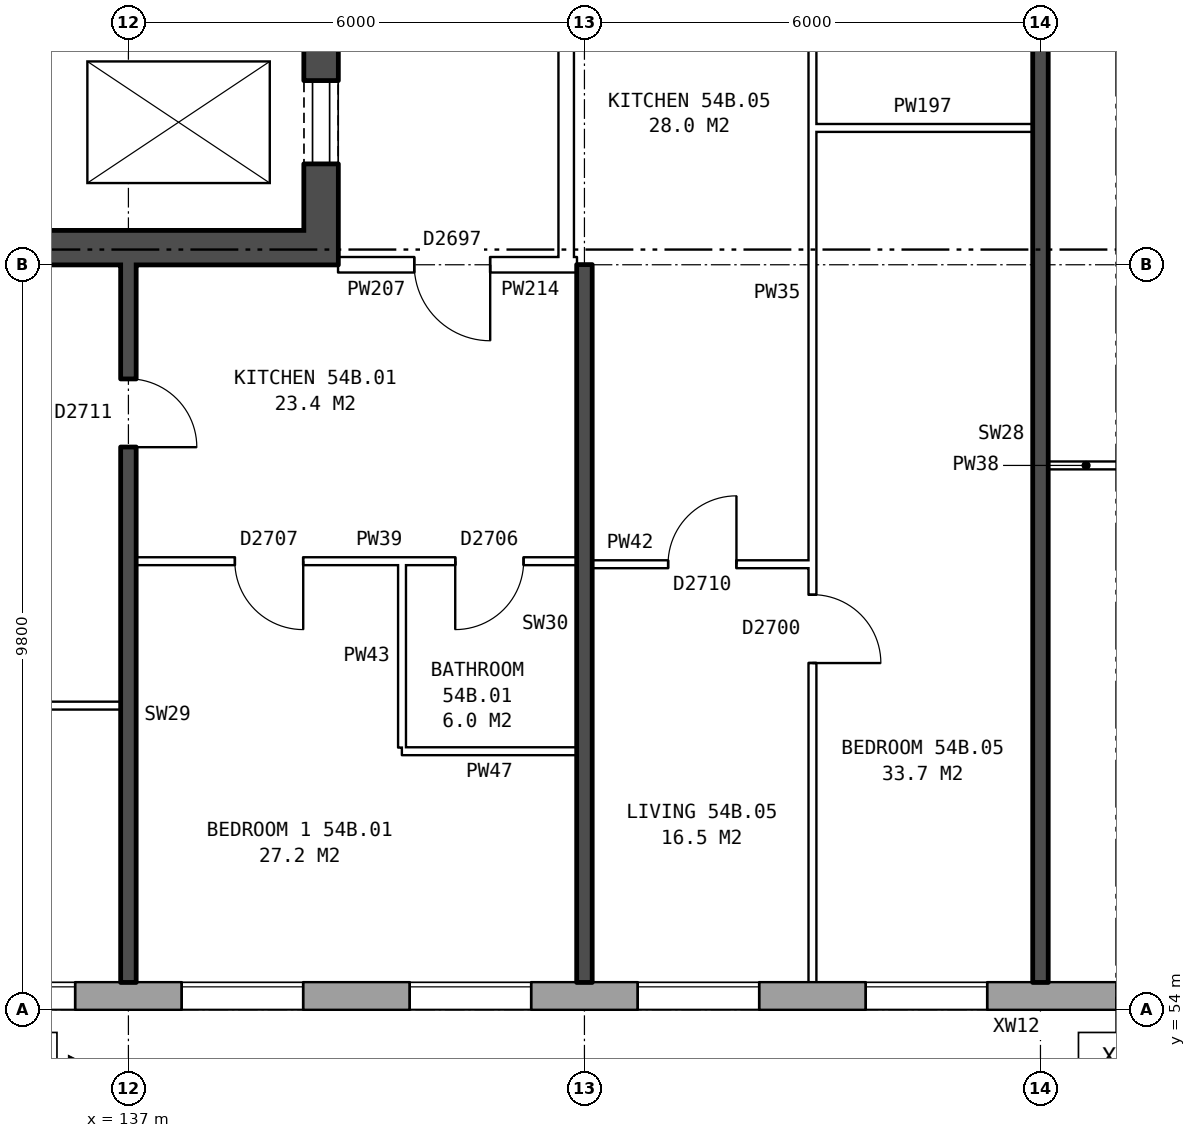
"""IFC4 building model, lengths in metres.
Left out: names, types, materials, properties, quantities, classifications, styles, units other than length and angle.
Written with IfcOpenShell. Run it as: python <this file> out.ifc"""

import sys

from ifc_helpers import new_model, si_unit, direction, frame, frame_2d, origin, place, context, subcontext, project, spatial, rectangle, extrude, element, fill, save


model = new_model("IFC4")
c1 = context("Model", 3, precision=1e-05, world=origin(), true_north=direction((0.0, 1.0)))
c2 = subcontext(c1, "Body", "Model", "MODEL_VIEW")
j1 = project(units=[si_unit("LENGTHUNIT", "METRE"), si_unit("PLANEANGLEUNIT", "RADIAN")], contexts=[c1])
p1 = place(None, origin())
s1 = spatial("IfcSite", under=j1, at=p1, CompositionType="ELEMENT")
p2 = place(p1, origin())
s2 = spatial("IfcBuilding", under=s1, at=p2, CompositionType="ELEMENT")
p3 = place(p2, frame((0.0, 0.0, 191.3)))
s3 = spatial("IfcBuildingStorey", under=s2, at=p3, CompositionType="ELEMENT", Elevation=191.3)
p4 = place(p3, frame((134.075, 54.18, 0.0), z_axis=(0.0, 0.0, 1.0), x_axis=(1.0, 0.0, 0.0)))
e1 = element("IfcWall", 1, at=p4, inside=s3, PredefinedType="STANDARD", context=c2, shape_type="SweptSolid", body=[
    extrude(rectangle(XDim=33.101, YDim=0.36, at=frame_2d((16.55, 0.0))), origin(), (0.0, 0.0, 1.0), 2.85),
])
p5 = place(p4, frame((0.625, 0.0, 0.8)))
e2 = element("IfcOpeningElement", 2, at=p5, cuts=e1, PredefinedType="OPENING", context=c2, shape_type="SweptSolid", body=[
    extrude(rectangle(XDim=1.6, YDim=1.8, at=frame_2d((0.8, 0.9))), frame((0.0, 0.19, 0.0), z_axis=(0.0, -1.0, 0.0), x_axis=(1.0, 0.0, 0.0)), (0.0, 0.0, 1.0), 0.38),
])
p6 = place(p4, frame((3.625, 0.0, 0.8)))
e3 = element("IfcOpeningElement", 3, at=p6, cuts=e1, PredefinedType="OPENING", context=c2, shape_type="SweptSolid", body=[
    extrude(rectangle(XDim=1.6, YDim=1.8, at=frame_2d((0.8, 0.9))), frame((0.0, 0.19, 0.0), z_axis=(0.0, -1.0, 0.0), x_axis=(1.0, 0.0, 0.0)), (0.0, 0.0, 1.0), 0.38),
])
p7 = place(p4, frame((6.625, 0.0, 0.8)))
e4 = element("IfcOpeningElement", 4, at=p7, cuts=e1, PredefinedType="OPENING", context=c2, shape_type="SweptSolid", body=[
    extrude(rectangle(XDim=1.6, YDim=1.8, at=frame_2d((0.8, 0.9))), frame((0.0, 0.19, 0.0), z_axis=(0.0, -1.0, 0.0), x_axis=(1.0, 0.0, 0.0)), (0.0, 0.0, 1.0), 0.38),
])
p8 = place(p4, frame((9.625, 0.0, 0.8)))
e5 = element("IfcOpeningElement", 5, at=p8, cuts=e1, PredefinedType="OPENING", context=c2, shape_type="SweptSolid", body=[
    extrude(rectangle(XDim=1.6, YDim=1.8, at=frame_2d((0.8, 0.9))), frame((0.0, 0.19, 0.0), z_axis=(0.0, -1.0, 0.0), x_axis=(1.0, 0.0, 0.0)), (0.0, 0.0, 1.0), 0.38),
])
p9 = place(p4, frame((12.625, 0.0, 0.8)))
e6 = element("IfcOpeningElement", 6, at=p9, cuts=e1, PredefinedType="OPENING", context=c2, shape_type="SweptSolid", body=[
    extrude(rectangle(XDim=1.6, YDim=1.8, at=frame_2d((0.8, 0.9))), frame((0.0, 0.19, 0.0), z_axis=(0.0, -1.0, 0.0), x_axis=(1.0, 0.0, 0.0)), (0.0, 0.0, 1.0), 0.38),
])
p10 = place(p4, frame((15.925, 0.0, 0.15)))
e7 = element("IfcOpeningElement", 7, at=p10, cuts=e1, PredefinedType="OPENING", context=c2, shape_type="SweptSolid", body=[
    extrude(rectangle(XDim=1.2, YDim=1.2, at=frame_2d((0.6, 0.6))), frame((0.0, 0.19, 0.0), z_axis=(0.0, -1.0, 0.0), x_axis=(1.0, 0.0, 0.0)), (0.0, 0.0, 1.0), 0.38),
])
p11 = place(p4, frame((18.625, 0.0, 0.8)))
e8 = element("IfcOpeningElement", 8, at=p11, cuts=e1, PredefinedType="OPENING", context=c2, shape_type="SweptSolid", body=[
    extrude(rectangle(XDim=1.6, YDim=1.8, at=frame_2d((0.8, 0.9))), frame((0.0, 0.19, 0.0), z_axis=(0.0, -1.0, 0.0), x_axis=(1.0, 0.0, 0.0)), (0.0, 0.0, 1.0), 0.38),
])
p12 = place(p4, frame((21.625, 0.0, 0.8)))
e9 = element("IfcOpeningElement", 9, at=p12, cuts=e1, PredefinedType="OPENING", context=c2, shape_type="SweptSolid", body=[
    extrude(rectangle(XDim=1.6, YDim=1.8, at=frame_2d((0.8, 0.9))), frame((0.0, 0.19, 0.0), z_axis=(0.0, -1.0, 0.0), x_axis=(1.0, 0.0, 0.0)), (0.0, 0.0, 1.0), 0.38),
])
p13 = place(p4, frame((24.625, 0.0, 0.8)))
e10 = element("IfcOpeningElement", 10, at=p13, cuts=e1, PredefinedType="OPENING", context=c2, shape_type="SweptSolid", body=[
    extrude(rectangle(XDim=1.6, YDim=1.8, at=frame_2d((0.8, 0.9))), frame((0.0, 0.19, 0.0), z_axis=(0.0, -1.0, 0.0), x_axis=(1.0, 0.0, 0.0)), (0.0, 0.0, 1.0), 0.38),
])
p14 = place(p4, frame((27.625, 0.0, 0.8)))
e11 = element("IfcOpeningElement", 11, at=p14, cuts=e1, PredefinedType="OPENING", context=c2, shape_type="SweptSolid", body=[
    extrude(rectangle(XDim=1.6, YDim=1.8, at=frame_2d((0.8, 0.9))), frame((0.0, 0.19, 0.0), z_axis=(0.0, -1.0, 0.0), x_axis=(1.0, 0.0, 0.0)), (0.0, 0.0, 1.0), 0.38),
])
p15 = place(p4, frame((30.625, 0.0, 0.8)))
e12 = element("IfcOpeningElement", 12, at=p15, cuts=e1, PredefinedType="OPENING", context=c2, shape_type="SweptSolid", body=[
    extrude(rectangle(XDim=1.6, YDim=1.8, at=frame_2d((0.8, 0.9))), frame((0.0, 0.19, 0.0), z_axis=(0.0, -1.0, 0.0), x_axis=(1.0, 0.0, 0.0)), (0.0, 0.0, 1.0), 0.38),
])
p16 = place(p3, frame((139.535, 63.8, 0.0), z_axis=(0.0, 0.0, 1.0), x_axis=(0.0, 1.0, 0.0)))
e13 = element("IfcWall", 13, at=p16, inside=s3, PredefinedType="SHEAR", context=c2, shape_type="SweptSolid", body=[
    extrude(rectangle(XDim=12.4, YDim=0.45, at=frame_2d((6.2, 0.0))), origin(), (0.0, 0.0, 1.0), 2.85),
])
p17 = place(p16, frame((1.325, 0.0, 0.0)))
e14 = element("IfcOpeningElement", 14, at=p17, cuts=e13, PredefinedType="OPENING", context=c2, shape_type="SweptSolid", body=[
    extrude(rectangle(XDim=1.1, YDim=2.1, at=frame_2d((0.55, 1.05))), frame((0.0, 0.235, 0.0), z_axis=(0.0, -1.0, 0.0), x_axis=(1.0, 0.0, 0.0)), (0.0, 0.0, 1.0), 0.47),
])
p18 = place(p16, frame((3.6, 0.0, 0.0)))
e15 = element("IfcOpeningElement", 15, at=p18, cuts=e13, PredefinedType="OPENING", context=c2, shape_type="SweptSolid", body=[
    extrude(rectangle(XDim=1.1, YDim=2.1, at=frame_2d((0.55, 1.05))), frame((0.0, 0.235, 0.0), z_axis=(0.0, -1.0, 0.0), x_axis=(1.0, 0.0, 0.0)), (0.0, 0.0, 1.0), 0.47),
])
p19 = place(p16, frame((5.8, 0.0, 0.0)))
e16 = element("IfcOpeningElement", 16, at=p19, cuts=e13, PredefinedType="OPENING", context=c2, shape_type="SweptSolid", body=[
    extrude(rectangle(XDim=1.1, YDim=2.1, at=frame_2d((0.55, 1.05))), frame((0.0, 0.235, 0.0), z_axis=(0.0, -1.0, 0.0), x_axis=(1.0, 0.0, 0.0)), (0.0, 0.0, 1.0), 0.47),
])
p20 = place(p16, frame((9.9, 0.0, 0.0)))
e17 = element("IfcOpeningElement", 17, at=p20, cuts=e13, PredefinedType="OPENING", context=c2, shape_type="SweptSolid", body=[
    extrude(rectangle(XDim=1.1, YDim=2.1, at=frame_2d((0.55, 1.05))), frame((0.0, 0.235, 0.0), z_axis=(0.0, -1.0, 0.0), x_axis=(1.0, 0.0, 0.0)), (0.0, 0.0, 1.0), 0.47),
])
p21 = place(p16, frame((8.125, 0.0, 0.0)))
e18 = element("IfcOpeningElement", 18, at=p21, cuts=e13, PredefinedType="OPENING", context=c2, shape_type="SweptSolid", body=[
    extrude(rectangle(XDim=0.85, YDim=2.1, at=frame_2d((0.425, 1.05))), frame((0.0, 0.235, 0.0), z_axis=(0.0, -1.0, 0.0), x_axis=(1.0, 0.0, 0.0)), (0.0, 0.0, 1.0), 0.47),
])
p22 = place(p3, frame((139.31, 64.025, 0.0), z_axis=(0.0, 0.0, 1.0), x_axis=(-1.0, 0.0, 0.0)))
e19 = element("IfcWall", 19, at=p22, inside=s3, PredefinedType="SHEAR", context=c2, shape_type="SweptSolid", body=[
    extrude(rectangle(XDim=7.5, YDim=0.45, at=frame_2d((3.75, 0.0))), origin(), (0.0, 0.0, 1.0), 2.85),
])
p23 = place(p3, frame((142.76, 63.9, 0.0), z_axis=(0.0, 0.0, 1.0), x_axis=(0.0, 1.0, 0.0)))
e20 = element("IfcWall", 20, at=p23, inside=s3, PredefinedType="PARTITIONING", context=c2, shape_type="SweptSolid", body=[
    extrude(rectangle(XDim=12.2, YDim=0.2, at=frame_2d((6.1, 0.0))), origin(), (0.0, 0.0, 1.0), 2.85),
])
p24 = place(p23, frame((5.1, 0.0, 0.0)))
e21 = element("IfcOpeningElement", 21, at=p24, cuts=e20, PredefinedType="OPENING", context=c2, shape_type="SweptSolid", body=[
    extrude(rectangle(XDim=2.0, YDim=2.1, at=frame_2d((1.0, 1.05))), frame((0.0, 0.11, 0.0), z_axis=(0.0, -1.0, 0.0), x_axis=(1.0, 0.0, 0.0)), (0.0, 0.0, 1.0), 0.22),
])
p25 = place(p3, frame((140.6, 57.4, 0.0), z_axis=(0.0, 0.0, 1.0), x_axis=(1.0, 0.0, 0.0)))
e22 = element("IfcWall", 22, at=p25, inside=s3, PredefinedType="PARTITIONING", context=c2, shape_type="SweptSolid", body=[
    extrude(rectangle(XDim=2.3, YDim=0.1, at=frame_2d((1.15, 0.0))), origin(), (0.0, 0.0, 1.0), 2.85),
])
p26 = place(p3, frame((131.36, 58.0, 0.0), z_axis=(0.0, 0.0, 1.0), x_axis=(1.0, 0.0, 0.0)))
e23 = element("IfcWall", 23, at=p26, inside=s3, PredefinedType="PARTITIONING", context=c2, shape_type="SweptSolid", body=[
    extrude(rectangle(XDim=5.54, YDim=0.1, at=frame_2d((2.77, 0.0))), origin(), (0.0, 0.0, 1.0), 2.85),
])
p27 = place(p26, frame((2.32, 0.0, 0.0)))
e24 = element("IfcOpeningElement", 24, at=p27, cuts=e23, PredefinedType="OPENING", context=c2, shape_type="SweptSolid", body=[
    extrude(rectangle(XDim=0.9, YDim=2.1, at=frame_2d((0.45, 1.05))), frame((0.0, 0.06, 0.0), z_axis=(0.0, -1.0, 0.0), x_axis=(1.0, 0.0, 0.0)), (0.0, 0.0, 1.0), 0.12),
])
p28 = place(p3, frame((143.1, 59.86, 0.0), z_axis=(0.0, 0.0, 1.0), x_axis=(1.0, 0.0, 0.0)))
e25 = element("IfcWall", 25, at=p28, inside=s3, PredefinedType="PARTITIONING", context=c2, shape_type="SweptSolid", body=[
    extrude(rectangle(XDim=2.9, YDim=0.1, at=frame_2d((1.45, 0.0))), origin(), (0.0, 0.0, 1.0), 2.85),
])
p29 = place(p28, frame((1.0, 0.0, 0.0)))
e26 = element("IfcOpeningElement", 26, at=p29, cuts=e25, PredefinedType="OPENING", context=c2, shape_type="SweptSolid", body=[
    extrude(rectangle(XDim=0.9, YDim=2.1, at=frame_2d((0.45, 1.05))), frame((0.0, 0.06, 0.0), z_axis=(0.0, -1.0, 0.0), x_axis=(1.0, 0.0, 0.0)), (0.0, 0.0, 1.0), 0.12),
])
p30 = place(p3, frame((137.1, 59.9, 0.0), z_axis=(0.0, 0.0, 1.0), x_axis=(1.0, 0.0, 0.0)))
e27 = element("IfcWall", 27, at=p30, inside=s3, PredefinedType="PARTITIONING", context=c2, shape_type="SweptSolid", body=[
    extrude(rectangle(XDim=5.8, YDim=0.1, at=frame_2d((2.9, 0.0))), origin(), (0.0, 0.0, 1.0), 2.85),
])
p31 = place(p30, frame((1.3, 0.0, 0.0)))
e28 = element("IfcOpeningElement", 28, at=p31, cuts=e27, PredefinedType="OPENING", context=c2, shape_type="SweptSolid", body=[
    extrude(rectangle(XDim=0.9, YDim=2.1, at=frame_2d((0.45, 1.05))), frame((0.0, 0.06, 0.0), z_axis=(0.0, -1.0, 0.0), x_axis=(1.0, 0.0, 0.0)), (0.0, 0.0, 1.0), 0.12),
])
p32 = place(p30, frame((4.2, 0.0, 0.0)))
e29 = element("IfcOpeningElement", 29, at=p32, cuts=e27, PredefinedType="OPENING", context=c2, shape_type="SweptSolid", body=[
    extrude(rectangle(XDim=0.9, YDim=2.1, at=frame_2d((0.45, 1.05))), frame((0.0, 0.06, 0.0), z_axis=(0.0, -1.0, 0.0), x_axis=(1.0, 0.0, 0.0)), (0.0, 0.0, 1.0), 0.12),
])
p33 = place(p3, frame((149.1, 61.16, 0.0), z_axis=(0.0, 0.0, 1.0), x_axis=(1.0, 0.0, 0.0)))
e30 = element("IfcWall", 30, at=p33, inside=s3, PredefinedType="PARTITIONING", context=c2, shape_type="SweptSolid", body=[
    extrude(rectangle(XDim=2.9, YDim=0.1, at=frame_2d((1.45, 0.0))), origin(), (0.0, 0.0, 1.0), 2.85),
])
p34 = place(p33, frame((1.0, 0.0, 0.0)))
e31 = element("IfcOpeningElement", 31, at=p34, cuts=e30, PredefinedType="OPENING", context=c2, shape_type="SweptSolid", body=[
    extrude(rectangle(XDim=0.9, YDim=2.1, at=frame_2d((0.45, 1.05))), frame((0.0, 0.06, 0.0), z_axis=(0.0, -1.0, 0.0), x_axis=(1.0, 0.0, 0.0)), (0.0, 0.0, 1.0), 0.12),
])
p35 = place(p3, frame((139.76, 63.8, 0.0), z_axis=(0.0, 0.0, 1.0), x_axis=(1.0, 0.0, 0.0)))
e32 = element("IfcWall", 32, at=p35, inside=s3, PredefinedType="PARTITIONING", context=c2, shape_type="SweptSolid", body=[
    extrude(rectangle(XDim=3.0, YDim=0.2, at=frame_2d((1.5, 0.0))), origin(), (0.0, 0.0, 1.0), 2.85),
])
p36 = place(p35, frame((1.0, 0.0, 0.0)))
e33 = element("IfcOpeningElement", 33, at=p36, cuts=e32, PredefinedType="OPENING", context=c2, shape_type="SweptSolid", body=[
    extrude(rectangle(XDim=1.0, YDim=2.1, at=frame_2d((0.5, 1.05))), frame((0.0, 0.11, 0.0), z_axis=(0.0, -1.0, 0.0), x_axis=(1.0, 0.0, 0.0)), (0.0, 0.0, 1.0), 0.22),
])
p37 = place(p3, frame((142.76, 63.8, 0.0), z_axis=(0.0, 0.0, 1.0), x_axis=(1.0, 0.0, 0.0)))
e34 = element("IfcWall", 34, at=p37, inside=s3, PredefinedType="PARTITIONING", context=c2, shape_type="SweptSolid", body=[
    extrude(rectangle(XDim=0.14, YDim=0.2, at=frame_2d((0.07, 0.0))), origin(), (0.0, 0.0, 1.0), 2.85),
])
p38 = place(p3, frame((146.0, 65.6, 0.0), z_axis=(0.0, 0.0, 1.0), x_axis=(1.0, 0.0, 0.0)))
e35 = element("IfcWall", 35, at=p38, inside=s3, PredefinedType="PARTITIONING", context=c2, shape_type="SweptSolid", body=[
    extrude(rectangle(XDim=2.9, YDim=0.1, at=frame_2d((1.45, 0.0))), origin(), (0.0, 0.0, 1.0), 2.85),
])
p39 = place(p3, frame((137.0, 54.36, 0.0), z_axis=(0.0, 0.0, 1.0), x_axis=(0.0, 1.0, 0.0)))
e36 = element("IfcWall", 36, at=p39, inside=s3, PredefinedType="SOLIDWALL", context=c2, shape_type="SweptSolid", body=[
    extrude(rectangle(XDim=9.44, YDim=0.2, at=frame_2d((4.72, 0.0))), origin(), (0.0, 0.0, 1.0), 2.85),
])
p40 = place(p39, frame((7.04, 0.0, 0.0)))
e37 = element("IfcOpeningElement", 37, at=p40, cuts=e36, PredefinedType="OPENING", context=c2, shape_type="SweptSolid", body=[
    extrude(rectangle(XDim=0.9, YDim=2.1, at=frame_2d((0.45, 1.05))), frame((0.0, 0.11, 0.0), z_axis=(0.0, -1.0, 0.0), x_axis=(1.0, 0.0, 0.0)), (0.0, 0.0, 1.0), 0.22),
])
p41 = place(p3, frame((140.6, 57.45, 0.0), z_axis=(0.0, 0.0, 1.0), x_axis=(0.0, 1.0, 0.0)))
e38 = element("IfcWall", 38, at=p41, inside=s3, PredefinedType="PARTITIONING", context=c2, shape_type="SweptSolid", body=[
    extrude(rectangle(XDim=2.4, YDim=0.1, at=frame_2d((1.2, 0.0))), origin(), (0.0, 0.0, 1.0), 2.85),
])
p42 = place(p3, frame((143.0, 54.36, 0.0), z_axis=(0.0, 0.0, 1.0), x_axis=(0.0, 1.0, 0.0)))
e39 = element("IfcWall", 39, at=p42, inside=s3, PredefinedType="SOLIDWALL", context=c2, shape_type="SweptSolid", body=[
    extrude(rectangle(XDim=9.44, YDim=0.2, at=frame_2d((4.72, 0.0))), origin(), (0.0, 0.0, 1.0), 2.85),
])
p43 = place(p3, frame((146.0, 54.36, 0.0), z_axis=(0.0, 0.0, 1.0), x_axis=(0.0, 1.0, 0.0)))
e40 = element("IfcWall", 40, at=p43, inside=s3, PredefinedType="PARTITIONING", context=c2, shape_type="SweptSolid", body=[
    extrude(rectangle(XDim=14.34, YDim=0.1, at=frame_2d((7.17, 0.0))), origin(), (0.0, 0.0, 1.0), 2.85),
])
p44 = place(p43, frame((4.2, 0.0, 0.0)))
e41 = element("IfcOpeningElement", 41, at=p44, cuts=e40, PredefinedType="OPENING", context=c2, shape_type="SweptSolid", body=[
    extrude(rectangle(XDim=0.9, YDim=2.1, at=frame_2d((0.45, 1.05))), frame((0.0, 0.06, 0.0), z_axis=(0.0, -1.0, 0.0), x_axis=(1.0, 0.0, 0.0)), (0.0, 0.0, 1.0), 0.12),
])
p45 = place(p43, frame((13.04, 0.0, 0.0)))
e42 = element("IfcOpeningElement", 42, at=p45, cuts=e40, PredefinedType="OPENING", context=c2, shape_type="SweptSolid", body=[
    extrude(rectangle(XDim=0.9, YDim=2.1, at=frame_2d((0.45, 1.05))), frame((0.0, 0.06, 0.0), z_axis=(0.0, -1.0, 0.0), x_axis=(1.0, 0.0, 0.0)), (0.0, 0.0, 1.0), 0.12),
])
p46 = place(p3, frame((149.0, 54.36, 0.0), z_axis=(0.0, 0.0, 1.0), x_axis=(0.0, 1.0, 0.0)))
e43 = element("IfcWall", 43, at=p46, inside=s3, PredefinedType="SOLIDWALL", context=c2, shape_type="SweptSolid", body=[
    extrude(rectangle(XDim=14.44, YDim=0.2, at=frame_2d((7.22, 0.0))), origin(), (0.0, 0.0, 1.0), 2.85),
])
p47 = place(p5, origin())
e44 = element("IfcWindow", 44, at=p47, inside=s3, PartitioningType="SINGLE_PANEL", PredefinedType="WINDOW", context=c2, shape_type="SweptSolid", body=[
    extrude(rectangle(XDim=1.6, YDim=1.8, at=frame_2d((0.8, 0.9))), frame((0.0, 0.15, 0.0), z_axis=(0.0, -1.0, 0.0), x_axis=(1.0, 0.0, 0.0)), (0.0, 0.0, 1.0), 0.06),
])
fill(e2, e44)
p48 = place(p6, origin())
e45 = element("IfcWindow", 45, at=p48, inside=s3, PartitioningType="SINGLE_PANEL", PredefinedType="WINDOW", context=c2, shape_type="SweptSolid", body=[
    extrude(rectangle(XDim=1.6, YDim=1.8, at=frame_2d((0.8, 0.9))), frame((0.0, 0.15, 0.0), z_axis=(0.0, -1.0, 0.0), x_axis=(1.0, 0.0, 0.0)), (0.0, 0.0, 1.0), 0.06),
])
fill(e3, e45)
p49 = place(p7, origin())
e46 = element("IfcWindow", 46, at=p49, inside=s3, PartitioningType="SINGLE_PANEL", PredefinedType="WINDOW", context=c2, shape_type="SweptSolid", body=[
    extrude(rectangle(XDim=1.6, YDim=1.8, at=frame_2d((0.8, 0.9))), frame((0.0, 0.15, 0.0), z_axis=(0.0, -1.0, 0.0), x_axis=(1.0, 0.0, 0.0)), (0.0, 0.0, 1.0), 0.06),
])
fill(e4, e46)
p50 = place(p8, origin())
e47 = element("IfcWindow", 47, at=p50, inside=s3, PartitioningType="SINGLE_PANEL", PredefinedType="WINDOW", context=c2, shape_type="SweptSolid", body=[
    extrude(rectangle(XDim=1.6, YDim=1.8, at=frame_2d((0.8, 0.9))), frame((0.0, 0.15, 0.0), z_axis=(0.0, -1.0, 0.0), x_axis=(1.0, 0.0, 0.0)), (0.0, 0.0, 1.0), 0.06),
])
fill(e5, e47)
p51 = place(p9, origin())
e48 = element("IfcWindow", 48, at=p51, inside=s3, PartitioningType="SINGLE_PANEL", PredefinedType="WINDOW", context=c2, shape_type="SweptSolid", body=[
    extrude(rectangle(XDim=1.6, YDim=1.8, at=frame_2d((0.8, 0.9))), frame((0.0, 0.15, 0.0), z_axis=(0.0, -1.0, 0.0), x_axis=(1.0, 0.0, 0.0)), (0.0, 0.0, 1.0), 0.06),
])
fill(e6, e48)
p52 = place(p17, origin())
e49 = element("IfcDoor", 49, at=p52, inside=s3, OperationType="DOUBLE_DOOR_SLIDING", PredefinedType="DOOR", context=c2, shape_type="SweptSolid", body=[
    extrude(rectangle(XDim=1.1, YDim=2.1, at=frame_2d((0.55, 1.05))), frame((0.0, 0.21, 0.0), z_axis=(0.0, -1.0, 0.0), x_axis=(1.0, 0.0, 0.0)), (0.0, 0.0, 1.0), 0.05),
])
fill(e14, e49)
p53 = place(p31, frame((0.9, 0.0, 0.0), z_axis=(0.0, 0.0, 1.0), x_axis=(-1.0, 0.0, 0.0)))
e50 = element("IfcDoor", 50, at=p53, inside=s3, OperationType="SINGLE_SWING_LEFT", PredefinedType="DOOR", context=c2, shape_type="SweptSolid", body=[
    extrude(rectangle(XDim=0.9, YDim=2.1, at=frame_2d((0.45, 1.05))), frame((0.0, 0.025, 0.0), z_axis=(0.0, -1.0, 0.0), x_axis=(1.0, 0.0, 0.0)), (0.0, 0.0, 1.0), 0.05),
])
fill(e28, e50)
p54 = place(p36, frame((1.0, 0.0, 0.0), z_axis=(0.0, 0.0, 1.0), x_axis=(-1.0, 0.0, 0.0)))
e51 = element("IfcDoor", 51, at=p54, inside=s3, OperationType="SINGLE_SWING_LEFT", PredefinedType="DOOR", context=c2, shape_type="SweptSolid", body=[
    extrude(rectangle(XDim=1.0, YDim=2.1, at=frame_2d((0.5, 1.05))), frame((0.0, 0.025, 0.0), z_axis=(0.0, -1.0, 0.0), x_axis=(1.0, 0.0, 0.0)), (0.0, 0.0, 1.0), 0.05),
])
fill(e33, e51)
p55 = place(p40, frame((0.9, 0.0, 0.0), z_axis=(0.0, 0.0, 1.0), x_axis=(-1.0, 0.0, 0.0)))
e52 = element("IfcDoor", 52, at=p55, inside=s3, OperationType="SINGLE_SWING_RIGHT", PredefinedType="DOOR", context=c2, shape_type="SweptSolid", body=[
    extrude(rectangle(XDim=0.9, YDim=2.1, at=frame_2d((0.45, 1.05))), frame((0.0, 0.025, 0.0), z_axis=(0.0, -1.0, 0.0), x_axis=(1.0, 0.0, 0.0)), (0.0, 0.0, 1.0), 0.05),
])
fill(e37, e52)
p56 = place(p32, frame((0.9, 0.0, 0.0), z_axis=(0.0, 0.0, 1.0), x_axis=(-1.0, 0.0, 0.0)))
e53 = element("IfcDoor", 53, at=p56, inside=s3, OperationType="SINGLE_SWING_RIGHT", PredefinedType="DOOR", context=c2, shape_type="SweptSolid", body=[
    extrude(rectangle(XDim=0.9, YDim=2.1, at=frame_2d((0.45, 1.05))), frame((0.0, 0.025, 0.0), z_axis=(0.0, -1.0, 0.0), x_axis=(1.0, 0.0, 0.0)), (0.0, 0.0, 1.0), 0.05),
])
fill(e29, e53)
p57 = place(p44, frame((0.9, 0.0, 0.0), z_axis=(0.0, 0.0, 1.0), x_axis=(-1.0, 0.0, 0.0)))
e54 = element("IfcDoor", 54, at=p57, inside=s3, OperationType="SINGLE_SWING_RIGHT", PredefinedType="DOOR", context=c2, shape_type="SweptSolid", body=[
    extrude(rectangle(XDim=0.9, YDim=2.1, at=frame_2d((0.45, 1.05))), frame((0.0, 0.025, 0.0), z_axis=(0.0, -1.0, 0.0), x_axis=(1.0, 0.0, 0.0)), (0.0, 0.0, 1.0), 0.05),
])
fill(e41, e54)
p58 = place(p29, origin())
e55 = element("IfcDoor", 55, at=p58, inside=s3, OperationType="SINGLE_SWING_RIGHT", PredefinedType="DOOR", context=c2, shape_type="SweptSolid", body=[
    extrude(rectangle(XDim=0.9, YDim=2.1, at=frame_2d((0.45, 1.05))), frame((0.0, 0.025, 0.0), z_axis=(0.0, -1.0, 0.0), x_axis=(1.0, 0.0, 0.0)), (0.0, 0.0, 1.0), 0.05),
])
fill(e26, e55)
save(model, sys.argv[1])
